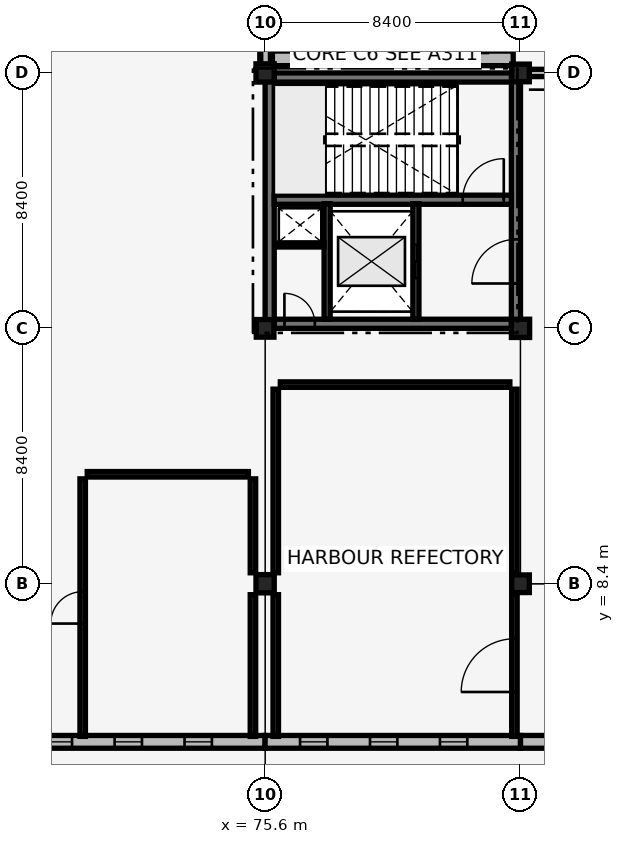
"""IFC4 building model, lengths in metres.
Left out: names, types, materials, properties, quantities, classifications, styles, units other than length and angle.
Written with IfcOpenShell. Run it as: python <this file> out.ifc"""

import sys

from ifc_helpers import new_model, si_unit, direction, frame, frame_2d, origin, origin_2d, place, context, subcontext, project, spatial, polyline, rectangle, outline, extrude, element, fill, save


model = new_model("IFC4")
c1 = context("Model", 3, precision=1e-05, world=origin(), true_north=direction((0.0, 1.0)))
c2 = subcontext(c1, "Body", "Model", "MODEL_VIEW")
j1 = project(units=[si_unit("LENGTHUNIT", "METRE"), si_unit("PLANEANGLEUNIT", "RADIAN")], contexts=[c1])
p1 = place(None, origin())
s1 = spatial("IfcSite", under=j1, at=p1, CompositionType="ELEMENT")
p2 = place(p1, origin())
s2 = spatial("IfcBuilding", under=s1, at=p2, CompositionType="ELEMENT")
p3 = place(p2, origin())
s3 = spatial("IfcBuildingStorey", under=s2, at=p3, CompositionType="ELEMENT", Elevation=0.0)
p4 = place(p3, frame((75.75, 16.95, 0.0), z_axis=(0.0, 0.0, 1.0), x_axis=(1.0, 0.0, 0.0)))
e1 = element("IfcWall", 1, at=p4, inside=s3, PredefinedType="SHEAR", context=c2, shape_type="SweptSolid", body=[
    extrude(rectangle(XDim=8.1, YDim=0.3, at=frame_2d((4.05, 0.0))), origin(), (0.0, 0.0, 1.0), 5.14),
])
p5 = place(p4, frame((0.485, 0.0, 0.0)))
e2 = element("IfcOpeningElement", 2, at=p5, cuts=e1, PredefinedType="OPENING", context=c2, shape_type="SweptSolid", body=[
    extrude(rectangle(XDim=1.0, YDim=2.15, at=frame_2d((0.5, 1.075))), frame((0.0, 0.16, 0.0), z_axis=(0.0, -1.0, 0.0), x_axis=(1.0, 0.0, 0.0)), (0.0, 0.0, 1.0), 0.32),
])
for number, where, z_axis, x_axis in (
    (3, (75.75, 25.05, 0.0), (0.0, 0.0, 1.0), (1.0, 0.0, 0.0)),
    (4, (75.75, 16.95, 0.0), (0.0, 0.0, 1.0), (0.0, 1.0, 0.0)),
):
    element("IfcWall", number, at=place(p3, frame(where, z_axis=z_axis, x_axis=x_axis)), inside=s3, PredefinedType="SHEAR", context=c2, shape_type="SweptSolid", body=[
        extrude(rectangle(XDim=8.1, YDim=0.3, at=frame_2d((4.05, 0.0))), origin(), (0.0, 0.0, 1.0), 5.14),
    ])
p6 = place(p3, frame((83.85, 16.95, 0.0), z_axis=(0.0, 0.0, 1.0), x_axis=(0.0, 1.0, 0.0)))
e5 = element("IfcWall", 5, at=p6, inside=s3, PredefinedType="SHEAR", context=c2, shape_type="SweptSolid", body=[
    extrude(rectangle(XDim=8.1, YDim=0.3, at=frame_2d((4.05, 0.0))), origin(), (0.0, 0.0, 1.0), 5.14),
])
p7 = place(p6, frame((1.325, 0.0, 0.0)))
e6 = element("IfcOpeningElement", 6, at=p7, cuts=e5, PredefinedType="OPENING", context=c2, shape_type="SweptSolid", body=[
    extrude(rectangle(XDim=1.45, YDim=2.15, at=frame_2d((0.725, 1.075))), frame((0.0, 0.16, 0.0), z_axis=(0.0, -1.0, 0.0), x_axis=(1.0, 0.0, 0.0)), (0.0, 0.0, 1.0), 0.32),
])
p8 = place(p3, frame((75.9, 21.03, 0.0), z_axis=(0.0, 0.0, 1.0), x_axis=(1.0, 0.0, 0.0)))
e7 = element("IfcWall", 7, at=p8, inside=s3, PredefinedType="SHEAR", context=c2, shape_type="SweptSolid", body=[
    extrude(rectangle(XDim=7.8, YDim=0.3, at=frame_2d((3.9, 0.0))), origin(), (0.0, 0.0, 1.0), 5.14),
])
p9 = place(p8, frame((6.2, 0.0, 0.0)))
e8 = element("IfcOpeningElement", 8, at=p9, cuts=e7, PredefinedType="OPENING", context=c2, shape_type="SweptSolid", body=[
    extrude(rectangle(XDim=1.35, YDim=2.15, at=frame_2d((0.675, 1.075))), frame((0.0, 0.16, 0.0), z_axis=(0.0, -1.0, 0.0), x_axis=(1.0, 0.0, 0.0)), (0.0, 0.0, 1.0), 0.32),
])
p10 = place(p3, frame((75.6, 8.4, 0.0), z_axis=(0.0, 0.0, 1.0), x_axis=(1.0, 0.0, 0.0)))
e9 = element("IfcColumn", 9, at=p10, inside=s3, PredefinedType="COLUMN", context=c2, shape_type="SweptSolid", body=[
    extrude(rectangle(XDim=0.6, YDim=0.6, at=origin_2d()), origin(), (0.0, 0.0, 1.0), 5.14),
])
p11 = place(p3, frame((75.6, 16.8, 0.0), z_axis=(0.0, 0.0, 1.0), x_axis=(1.0, 0.0, 0.0)))
e10 = element("IfcColumn", 10, at=p11, inside=s3, PredefinedType="COLUMN", context=c2, shape_type="SweptSolid", body=[
    extrude(rectangle(XDim=0.58, YDim=0.58, at=origin_2d()), origin(), (0.0, 0.0, 1.0), 5.14),
])
p12 = place(p3, frame((75.6, 25.2, 0.0), z_axis=(0.0, 0.0, 1.0), x_axis=(1.0, 0.0, 0.0)))
e11 = element("IfcColumn", 11, at=p12, inside=s3, PredefinedType="COLUMN", context=c2, shape_type="SweptSolid", body=[
    extrude(rectangle(XDim=0.6, YDim=0.6, at=origin_2d()), origin(), (0.0, 0.0, 1.0), 5.14),
])
p13 = place(p3, frame((84.0, 8.4, 0.0), z_axis=(0.0, 0.0, 1.0), x_axis=(1.0, 0.0, 0.0)))
e12 = element("IfcColumn", 12, at=p13, inside=s3, PredefinedType="COLUMN", context=c2, shape_type="SweptSolid", body=[
    extrude(rectangle(XDim=0.58, YDim=0.58, at=origin_2d()), origin(), (0.0, 0.0, 1.0), 5.14),
])
p14 = place(p3, frame((84.0, 16.8, 0.0), z_axis=(0.0, 0.0, 1.0), x_axis=(1.0, 0.0, 0.0)))
e13 = element("IfcColumn", 13, at=p14, inside=s3, PredefinedType="COLUMN", context=c2, shape_type="SweptSolid", body=[
    extrude(rectangle(XDim=0.6, YDim=0.6, at=origin_2d()), origin(), (0.0, 0.0, 1.0), 5.14),
])
p15 = place(p3, frame((84.0, 25.2, 0.0), z_axis=(0.0, 0.0, 1.0), x_axis=(1.0, 0.0, 0.0)))
e14 = element("IfcColumn", 14, at=p15, inside=s3, PredefinedType="COLUMN", context=c2, shape_type="SweptSolid", body=[
    extrude(rectangle(XDim=0.58, YDim=0.58, at=origin_2d()), origin(), (0.0, 0.0, 1.0), 5.14),
])
p16 = place(p3, frame((75.6, 25.2, 5.145), z_axis=(0.0, 0.0, 1.0), x_axis=(0.0, 1.0, 0.0)))
e15 = element("IfcWall", 15, at=p16, inside=s3, PredefinedType="SOLIDWALL", context=c2, shape_type="SweptSolid", body=[
    extrude(outline(polyline([(0.0, 0.0), (8.4, 0.0), (8.4, 0.25), (4.2, 2.489), (0.0, 0.25), (0.0, 0.0)])), frame((0.0, 0.175, 0.0), z_axis=(0.0, -1.0, 0.0), x_axis=(1.0, 0.0, 0.0)), (0.0, 0.0, 1.0), 0.35),
])
p17 = place(p3, frame((67.2, 3.2, 0.0), z_axis=(0.0, 0.0, 1.0), x_axis=(1.0, 0.0, 0.0)))
e16 = element("IfcWall", 16, at=p17, inside=s3, PredefinedType="SOLIDWALL", context=c2, shape_type="SweptSolid", body=[
    extrude(rectangle(XDim=8.4, YDim=0.42, at=frame_2d((4.2, 0.0))), origin(), (0.0, 0.0, 1.0), 4.83),
])
p18 = place(p17, frame((1.15, 0.0, 0.85)))
e17 = element("IfcOpeningElement", 17, at=p18, cuts=e16, PredefinedType="OPENING", context=c2, shape_type="SweptSolid", body=[
    extrude(rectangle(XDim=0.9, YDim=3.0, at=frame_2d((0.45, 1.5))), frame((0.0, 0.22, 0.0), z_axis=(0.0, -1.0, 0.0), x_axis=(1.0, 0.0, 0.0)), (0.0, 0.0, 1.0), 0.44),
])
p19 = place(p17, frame((3.45, 0.0, 0.85)))
e18 = element("IfcOpeningElement", 18, at=p19, cuts=e16, PredefinedType="OPENING", context=c2, shape_type="SweptSolid", body=[
    extrude(rectangle(XDim=0.9, YDim=3.0, at=frame_2d((0.45, 1.5))), frame((0.0, 0.22, 0.0), z_axis=(0.0, -1.0, 0.0), x_axis=(1.0, 0.0, 0.0)), (0.0, 0.0, 1.0), 0.44),
])
p20 = place(p17, frame((5.75, 0.0, 0.85)))
e19 = element("IfcOpeningElement", 19, at=p20, cuts=e16, PredefinedType="OPENING", context=c2, shape_type="SweptSolid", body=[
    extrude(rectangle(XDim=0.9, YDim=3.0, at=frame_2d((0.45, 1.5))), frame((0.0, 0.22, 0.0), z_axis=(0.0, -1.0, 0.0), x_axis=(1.0, 0.0, 0.0)), (0.0, 0.0, 1.0), 0.44),
])
p21 = place(p3, frame((75.6, 3.2, 0.0), z_axis=(0.0, 0.0, 1.0), x_axis=(1.0, 0.0, 0.0)))
e20 = element("IfcWall", 20, at=p21, inside=s3, PredefinedType="SOLIDWALL", context=c2, shape_type="SweptSolid", body=[
    extrude(rectangle(XDim=8.4, YDim=0.42, at=frame_2d((4.2, 0.0))), origin(), (0.0, 0.0, 1.0), 4.49),
])
p22 = place(p21, frame((1.15, 0.0, 0.85)))
e21 = element("IfcOpeningElement", 21, at=p22, cuts=e20, PredefinedType="OPENING", context=c2, shape_type="SweptSolid", body=[
    extrude(rectangle(XDim=0.9, YDim=3.0, at=frame_2d((0.45, 1.5))), frame((0.0, 0.22, 0.0), z_axis=(0.0, -1.0, 0.0), x_axis=(1.0, 0.0, 0.0)), (0.0, 0.0, 1.0), 0.44),
])
p23 = place(p21, frame((3.45, 0.0, 0.85)))
e22 = element("IfcOpeningElement", 22, at=p23, cuts=e20, PredefinedType="OPENING", context=c2, shape_type="SweptSolid", body=[
    extrude(rectangle(XDim=0.9, YDim=3.0, at=frame_2d((0.45, 1.5))), frame((0.0, 0.22, 0.0), z_axis=(0.0, -1.0, 0.0), x_axis=(1.0, 0.0, 0.0)), (0.0, 0.0, 1.0), 0.44),
])
p24 = place(p21, frame((5.75, 0.0, 0.85)))
e23 = element("IfcOpeningElement", 23, at=p24, cuts=e20, PredefinedType="OPENING", context=c2, shape_type="SweptSolid", body=[
    extrude(rectangle(XDim=0.9, YDim=3.0, at=frame_2d((0.45, 1.5))), frame((0.0, 0.22, 0.0), z_axis=(0.0, -1.0, 0.0), x_axis=(1.0, 0.0, 0.0)), (0.0, 0.0, 1.0), 0.44),
])
p25 = place(p3, frame((75.84, 25.68, -0.25), z_axis=(0.0, 0.0, 1.0), x_axis=(1.0, 0.0, 0.0)))
e24 = element("IfcWall", 24, at=p25, inside=s3, PredefinedType="SOLIDWALL", context=c2, shape_type="SweptSolid", body=[
    extrude(rectangle(XDim=7.92, YDim=0.48, at=frame_2d((3.96, 0.0))), origin(), (0.0, 0.0, 1.0), 5.69),
])
p26 = place(p3, frame((84.0, 3.2, 0.0), z_axis=(0.0, 0.0, 1.0), x_axis=(1.0, 0.0, 0.0)))
e25 = element("IfcWall", 25, at=p26, inside=s3, PredefinedType="SOLIDWALL", context=c2, shape_type="SweptSolid", body=[
    extrude(rectangle(XDim=8.4, YDim=0.42, at=frame_2d((4.2, 0.0))), origin(), (0.0, 0.0, 1.0), 4.49),
])
p27 = place(p26, frame((3.1, 0.0, 0.0)))
e26 = element("IfcOpeningElement", 26, at=p27, cuts=e25, PredefinedType="OPENING", context=c2, shape_type="SweptSolid", body=[
    extrude(rectangle(XDim=2.2, YDim=2.4, at=frame_2d((1.1, 1.2))), frame((0.0, 0.22, 0.0), z_axis=(0.0, -1.0, 0.0), x_axis=(1.0, 0.0, 0.0)), (0.0, 0.0, 1.0), 0.44),
])
p28 = place(p3, frame((84.275, 25.2, 0.0), z_axis=(0.0, 0.0, 1.0), x_axis=(1.0, 0.0, 0.0)))
e27 = element("IfcWall", 27, at=p28, inside=s3, PredefinedType="SOLIDWALL", context=c2, shape_type="SweptSolid", body=[
    extrude(rectangle(XDim=7.84, YDim=0.24, at=frame_2d((3.92, 0.0))), origin(), (0.0, 0.0, 1.0), 4.39),
])
p29 = place(p28, frame((0.804, 0.0, 0.35)))
e28 = element("IfcOpeningElement", 28, at=p29, cuts=e27, PredefinedType="OPENING", context=c2, shape_type="SweptSolid", body=[
    extrude(rectangle(XDim=0.44, YDim=1.25, at=frame_2d((0.22, 0.625))), frame((0.0, 0.13, 0.0), z_axis=(0.0, -1.0, 0.0), x_axis=(1.0, 0.0, 0.0)), (0.0, 0.0, 1.0), 0.26),
])
p30 = place(p28, frame((2.252, 0.0, 0.35)))
e29 = element("IfcOpeningElement", 29, at=p30, cuts=e27, PredefinedType="OPENING", context=c2, shape_type="SweptSolid", body=[
    extrude(rectangle(XDim=0.44, YDim=1.25, at=frame_2d((0.22, 0.625))), frame((0.0, 0.13, 0.0), z_axis=(0.0, -1.0, 0.0), x_axis=(1.0, 0.0, 0.0)), (0.0, 0.0, 1.0), 0.26),
])
p31 = place(p28, frame((3.7, 0.0, 0.35)))
e30 = element("IfcOpeningElement", 30, at=p31, cuts=e27, PredefinedType="OPENING", context=c2, shape_type="SweptSolid", body=[
    extrude(rectangle(XDim=0.44, YDim=1.25, at=frame_2d((0.22, 0.625))), frame((0.0, 0.13, 0.0), z_axis=(0.0, -1.0, 0.0), x_axis=(1.0, 0.0, 0.0)), (0.0, 0.0, 1.0), 0.26),
])
p32 = place(p28, frame((5.148, 0.0, 0.35)))
e31 = element("IfcOpeningElement", 31, at=p32, cuts=e27, PredefinedType="OPENING", context=c2, shape_type="SweptSolid", body=[
    extrude(rectangle(XDim=0.44, YDim=1.25, at=frame_2d((0.22, 0.625))), frame((0.0, 0.13, 0.0), z_axis=(0.0, -1.0, 0.0), x_axis=(1.0, 0.0, 0.0)), (0.0, 0.0, 1.0), 0.26),
])
p33 = place(p28, frame((6.596, 0.0, 0.35)))
e32 = element("IfcOpeningElement", 32, at=p33, cuts=e27, PredefinedType="OPENING", context=c2, shape_type="SweptSolid", body=[
    extrude(rectangle(XDim=0.44, YDim=1.25, at=frame_2d((0.22, 0.625))), frame((0.0, 0.13, 0.0), z_axis=(0.0, -1.0, 0.0), x_axis=(1.0, 0.0, 0.0)), (0.0, 0.0, 1.0), 0.26),
])
p34 = place(p28, frame((0.804, 0.0, 1.8)))
e33 = element("IfcOpeningElement", 33, at=p34, cuts=e27, PredefinedType="OPENING", context=c2, shape_type="SweptSolid", body=[
    extrude(rectangle(XDim=0.44, YDim=1.25, at=frame_2d((0.22, 0.625))), frame((0.0, 0.13, 0.0), z_axis=(0.0, -1.0, 0.0), x_axis=(1.0, 0.0, 0.0)), (0.0, 0.0, 1.0), 0.26),
])
p35 = place(p28, frame((2.252, 0.0, 1.8)))
e34 = element("IfcOpeningElement", 34, at=p35, cuts=e27, PredefinedType="OPENING", context=c2, shape_type="SweptSolid", body=[
    extrude(rectangle(XDim=0.44, YDim=1.25, at=frame_2d((0.22, 0.625))), frame((0.0, 0.13, 0.0), z_axis=(0.0, -1.0, 0.0), x_axis=(1.0, 0.0, 0.0)), (0.0, 0.0, 1.0), 0.26),
])
p36 = place(p28, frame((3.7, 0.0, 1.8)))
e35 = element("IfcOpeningElement", 35, at=p36, cuts=e27, PredefinedType="OPENING", context=c2, shape_type="SweptSolid", body=[
    extrude(rectangle(XDim=0.44, YDim=1.25, at=frame_2d((0.22, 0.625))), frame((0.0, 0.13, 0.0), z_axis=(0.0, -1.0, 0.0), x_axis=(1.0, 0.0, 0.0)), (0.0, 0.0, 1.0), 0.26),
])
p37 = place(p28, frame((5.148, 0.0, 1.8)))
e36 = element("IfcOpeningElement", 36, at=p37, cuts=e27, PredefinedType="OPENING", context=c2, shape_type="SweptSolid", body=[
    extrude(rectangle(XDim=0.44, YDim=1.25, at=frame_2d((0.22, 0.625))), frame((0.0, 0.13, 0.0), z_axis=(0.0, -1.0, 0.0), x_axis=(1.0, 0.0, 0.0)), (0.0, 0.0, 1.0), 0.26),
])
p38 = place(p28, frame((6.596, 0.0, 1.8)))
e37 = element("IfcOpeningElement", 37, at=p38, cuts=e27, PredefinedType="OPENING", context=c2, shape_type="SweptSolid", body=[
    extrude(rectangle(XDim=0.44, YDim=1.25, at=frame_2d((0.22, 0.625))), frame((0.0, 0.13, 0.0), z_axis=(0.0, -1.0, 0.0), x_axis=(1.0, 0.0, 0.0)), (0.0, 0.0, 1.0), 0.26),
])
p39 = place(p3, frame((80.56, 17.1, 0.0), z_axis=(0.0, 0.0, 1.0), x_axis=(0.0, 1.0, 0.0)))
e38 = element("IfcWall", 38, at=p39, inside=s3, PredefinedType="SHEAR", context=c2, shape_type="SweptSolid", body=[
    extrude(rectangle(XDim=3.8, YDim=0.2, at=frame_2d((1.9, 0.0))), origin(), (0.0, 0.0, 1.0), 4.36),
])
p40 = place(p39, frame((1.35, 0.0, 0.0)))
e39 = element("IfcOpeningElement", 39, at=p40, cuts=e38, PredefinedType="OPENING", context=c2, shape_type="SweptSolid", body=[
    extrude(rectangle(XDim=1.1, YDim=2.15, at=frame_2d((0.55, 1.075))), frame((0.0, 0.11, 0.0), z_axis=(0.0, -1.0, 0.0), x_axis=(1.0, 0.0, 0.0)), (0.0, 0.0, 1.0), 0.22),
])
p41 = place(p3, frame((77.64, 17.1, 0.0), z_axis=(0.0, 0.0, 1.0), x_axis=(0.0, 1.0, 0.0)))
e40 = element("IfcWall", 40, at=p41, inside=s3, PredefinedType="SHEAR", context=c2, shape_type="SweptSolid", body=[
    extrude(rectangle(XDim=3.8, YDim=0.2, at=frame_2d((1.9, 0.0))), origin(), (0.0, 0.0, 1.0), 4.36),
])
p42 = place(p3, frame((75.92, 19.54, 0.0), z_axis=(0.0, 0.0, 1.0), x_axis=(1.0, 0.0, 0.0)))
e41 = element("IfcWall", 41, at=p42, inside=s3, PredefinedType="PARTITIONING", context=c2, shape_type="SweptSolid", body=[
    extrude(rectangle(XDim=1.62, YDim=0.13, at=frame_2d((0.81, 0.0))), origin(), (0.0, 0.0, 1.0), 5.14),
])
p43 = place(p3, frame((69.6, 3.38, 0.0), z_axis=(0.0, 0.0, 1.0), x_axis=(0.0, 1.0, 0.0)))
e42 = element("IfcWall", 42, at=p43, inside=s3, PredefinedType="PARTITIONING", context=c2, shape_type="SweptSolid", body=[
    extrude(rectangle(XDim=8.47, YDim=0.18, at=frame_2d((4.235, 0.0))), origin(), (0.0, 0.0, 1.0), 4.39),
])
p44 = place(p43, frame((3.71, 0.0, 0.0)))
e43 = element("IfcOpeningElement", 43, at=p44, cuts=e42, PredefinedType="OPENING", context=c2, shape_type="SweptSolid", body=[
    extrude(rectangle(XDim=1.05, YDim=2.15, at=frame_2d((0.525, 1.075))), frame((0.0, 0.1, 0.0), z_axis=(0.0, -1.0, 0.0), x_axis=(1.0, 0.0, 0.0)), (0.0, 0.0, 1.0), 0.2),
])
p45 = place(p3, frame((69.75, 12.0, 0.0), z_axis=(0.0, 0.0, 1.0), x_axis=(1.0, 0.0, 0.0)))
e44 = element("IfcWall", 44, at=p45, inside=s3, PredefinedType="PARTITIONING", context=c2, shape_type="SweptSolid", body=[
    extrude(rectangle(XDim=5.3, YDim=0.18, at=frame_2d((2.65, 0.0))), origin(), (0.0, 0.0, 1.0), 5.14),
])
p46 = place(p3, frame((75.2, 3.38, 0.0), z_axis=(0.0, 0.0, 1.0), x_axis=(0.0, 1.0, 0.0)))
e45 = element("IfcWall", 45, at=p46, inside=s3, PredefinedType="PARTITIONING", context=c2, shape_type="SweptSolid", body=[
    extrude(rectangle(XDim=4.66, YDim=0.18, at=frame_2d((2.33, 0.0))), origin(), (0.0, 0.0, 1.0), 5.14),
])
p47 = place(p3, frame((75.2, 8.76, 0.0), z_axis=(0.0, 0.0, 1.0), x_axis=(0.0, 1.0, 0.0)))
e46 = element("IfcWall", 46, at=p47, inside=s3, PredefinedType="PARTITIONING", context=c2, shape_type="SweptSolid", body=[
    extrude(rectangle(XDim=3.09, YDim=0.18, at=frame_2d((1.545, 0.0))), origin(), (0.0, 0.0, 1.0), 5.14),
])
p48 = place(p3, frame((83.8, 3.38, 0.0), z_axis=(0.0, 0.0, 1.0), x_axis=(0.0, 1.0, 0.0)))
e47 = element("IfcWall", 47, at=p48, inside=s3, PredefinedType="PARTITIONING", context=c2, shape_type="SweptSolid", body=[
    extrude(rectangle(XDim=4.67, YDim=0.18, at=frame_2d((2.335, 0.0))), origin(), (0.0, 0.0, 1.0), 4.49),
])
p49 = place(p48, frame((1.46, 0.0, 0.0)))
e48 = element("IfcOpeningElement", 48, at=p49, cuts=e47, PredefinedType="OPENING", context=c2, shape_type="SweptSolid", body=[
    extrude(rectangle(XDim=1.75, YDim=2.3, at=frame_2d((0.875, 1.15))), frame((0.0, 0.1, 0.0), z_axis=(0.0, -1.0, 0.0), x_axis=(1.0, 0.0, 0.0)), (0.0, 0.0, 1.0), 0.2),
])
p50 = place(p3, frame((83.8, 8.75, 0.0), z_axis=(0.0, 0.0, 1.0), x_axis=(0.0, 1.0, 0.0)))
e49 = element("IfcWall", 49, at=p50, inside=s3, PredefinedType="PARTITIONING", context=c2, shape_type="SweptSolid", body=[
    extrude(rectangle(XDim=6.05, YDim=0.18, at=frame_2d((3.025, 0.0))), origin(), (0.0, 0.0, 1.0), 4.49),
])
p51 = place(p3, frame((76.1, 14.95, 0.0), z_axis=(0.0, 0.0, 1.0), x_axis=(1.0, 0.0, 0.0)))
e50 = element("IfcWall", 50, at=p51, inside=s3, PredefinedType="PARTITIONING", context=c2, shape_type="SweptSolid", body=[
    extrude(rectangle(XDim=7.55, YDim=0.18, at=frame_2d((3.775, 0.0))), origin(), (0.0, 0.0, 1.0), 5.14),
])
p52 = place(p3, frame((75.95, 3.38, 0.0), z_axis=(0.0, 0.0, 1.0), x_axis=(0.0, 1.0, 0.0)))
e51 = element("IfcWall", 51, at=p52, inside=s3, PredefinedType="PARTITIONING", context=c2, shape_type="SweptSolid", body=[
    extrude(rectangle(XDim=4.66, YDim=0.18, at=frame_2d((2.33, 0.0))), origin(), (0.0, 0.0, 1.0), 4.58),
])
p53 = place(p3, frame((75.95, 8.76, 0.0), z_axis=(0.0, 0.0, 1.0), x_axis=(0.0, 1.0, 0.0)))
e52 = element("IfcWall", 52, at=p53, inside=s3, PredefinedType="PARTITIONING", context=c2, shape_type="SweptSolid", body=[
    extrude(rectangle(XDim=6.04, YDim=0.18, at=frame_2d((3.02, 0.0))), origin(), (0.0, 0.0, 1.0), 4.59),
])
p54 = place(p18, origin())
e53 = element("IfcWindow", 53, at=p54, inside=s3, PartitioningType="DOUBLE_PANEL_VERTICAL", PredefinedType="WINDOW", context=c2, shape_type="SweptSolid", body=[
    extrude(rectangle(XDim=0.9, YDim=3.0, at=frame_2d((0.45, 1.5))), frame((0.0, 0.03, 0.0), z_axis=(0.0, -1.0, 0.0), x_axis=(1.0, 0.0, 0.0)), (0.0, 0.0, 1.0), 0.06),
])
fill(e17, e53)
p55 = place(p19, origin())
e54 = element("IfcWindow", 54, at=p55, inside=s3, PartitioningType="DOUBLE_PANEL_VERTICAL", PredefinedType="WINDOW", context=c2, shape_type="SweptSolid", body=[
    extrude(rectangle(XDim=0.9, YDim=3.0, at=frame_2d((0.45, 1.5))), frame((0.0, 0.03, 0.0), z_axis=(0.0, -1.0, 0.0), x_axis=(1.0, 0.0, 0.0)), (0.0, 0.0, 1.0), 0.06),
])
fill(e18, e54)
p56 = place(p20, origin())
e55 = element("IfcWindow", 55, at=p56, inside=s3, PartitioningType="DOUBLE_PANEL_VERTICAL", PredefinedType="WINDOW", context=c2, shape_type="SweptSolid", body=[
    extrude(rectangle(XDim=0.9, YDim=3.0, at=frame_2d((0.45, 1.5))), frame((0.0, 0.03, 0.0), z_axis=(0.0, -1.0, 0.0), x_axis=(1.0, 0.0, 0.0)), (0.0, 0.0, 1.0), 0.06),
])
fill(e19, e55)
p57 = place(p22, origin())
e56 = element("IfcWindow", 56, at=p57, inside=s3, PartitioningType="DOUBLE_PANEL_VERTICAL", PredefinedType="WINDOW", context=c2, shape_type="SweptSolid", body=[
    extrude(rectangle(XDim=0.9, YDim=3.0, at=frame_2d((0.45, 1.5))), frame((0.0, 0.03, 0.0), z_axis=(0.0, -1.0, 0.0), x_axis=(1.0, 0.0, 0.0)), (0.0, 0.0, 1.0), 0.06),
])
fill(e21, e56)
p58 = place(p23, origin())
e57 = element("IfcWindow", 57, at=p58, inside=s3, PartitioningType="DOUBLE_PANEL_VERTICAL", PredefinedType="WINDOW", context=c2, shape_type="SweptSolid", body=[
    extrude(rectangle(XDim=0.9, YDim=3.0, at=frame_2d((0.45, 1.5))), frame((0.0, 0.03, 0.0), z_axis=(0.0, -1.0, 0.0), x_axis=(1.0, 0.0, 0.0)), (0.0, 0.0, 1.0), 0.06),
])
fill(e22, e57)
p59 = place(p24, origin())
e58 = element("IfcWindow", 58, at=p59, inside=s3, PartitioningType="DOUBLE_PANEL_VERTICAL", PredefinedType="WINDOW", context=c2, shape_type="SweptSolid", body=[
    extrude(rectangle(XDim=0.9, YDim=3.0, at=frame_2d((0.45, 1.5))), frame((0.0, 0.03, 0.0), z_axis=(0.0, -1.0, 0.0), x_axis=(1.0, 0.0, 0.0)), (0.0, 0.0, 1.0), 0.06),
])
fill(e23, e58)
p60 = place(p9, origin())
e59 = element("IfcDoor", 59, at=p60, inside=s3, OperationType="SINGLE_SWING_RIGHT", PredefinedType="DOOR", context=c2, shape_type="SweptSolid", body=[
    extrude(rectangle(XDim=1.35, YDim=2.15, at=frame_2d((0.675, 1.075))), frame((0.0, 0.025, 0.0), z_axis=(0.0, -1.0, 0.0), x_axis=(1.0, 0.0, 0.0)), (0.0, 0.0, 1.0), 0.05),
])
fill(e8, e59)
p61 = place(p40, origin())
e60 = element("IfcDoor", 60, at=p61, inside=s3, OperationType="SLIDING_TO_LEFT", PredefinedType="DOOR", context=c2, shape_type="SweptSolid", body=[
    extrude(rectangle(XDim=1.1, YDim=2.15, at=frame_2d((0.55, 1.075))), frame((0.0, 0.025, 0.0), z_axis=(0.0, -1.0, 0.0), x_axis=(1.0, 0.0, 0.0)), (0.0, 0.0, 1.0), 0.05),
])
fill(e39, e60)
p62 = place(p7, origin())
e61 = element("IfcDoor", 61, at=p62, inside=s3, OperationType="DOUBLE_DOOR_SINGLE_SWING", PredefinedType="DOOR", context=c2, shape_type="SweptSolid", body=[
    extrude(rectangle(XDim=1.45, YDim=2.15, at=frame_2d((0.725, 1.075))), frame((0.0, 0.025, 0.0), z_axis=(0.0, -1.0, 0.0), x_axis=(1.0, 0.0, 0.0)), (0.0, 0.0, 1.0), 0.05),
])
fill(e6, e61)
p63 = place(p5, origin())
e62 = element("IfcDoor", 62, at=p63, inside=s3, OperationType="SINGLE_SWING_LEFT", PredefinedType="DOOR", context=c2, shape_type="SweptSolid", body=[
    extrude(rectangle(XDim=1.0, YDim=2.15, at=frame_2d((0.5, 1.075))), frame((0.0, 0.025, 0.0), z_axis=(0.0, -1.0, 0.0), x_axis=(1.0, 0.0, 0.0)), (0.0, 0.0, 1.0), 0.05),
])
fill(e2, e62)
p64 = place(p44, origin())
e63 = element("IfcDoor", 63, at=p64, inside=s3, OperationType="SINGLE_SWING_LEFT", PredefinedType="DOOR", context=c2, shape_type="SweptSolid", body=[
    extrude(rectangle(XDim=1.05, YDim=2.15, at=frame_2d((0.525, 1.075))), frame((0.0, 0.025, 0.0), z_axis=(0.0, -1.0, 0.0), x_axis=(1.0, 0.0, 0.0)), (0.0, 0.0, 1.0), 0.05),
])
fill(e43, e63)
p65 = place(p49, origin())
e64 = element("IfcDoor", 64, at=p65, inside=s3, OperationType="DOUBLE_DOOR_SINGLE_SWING", PredefinedType="DOOR", context=c2, shape_type="SweptSolid", body=[
    extrude(rectangle(XDim=1.75, YDim=2.3, at=frame_2d((0.875, 1.15))), frame((0.0, 0.025, 0.0), z_axis=(0.0, -1.0, 0.0), x_axis=(1.0, 0.0, 0.0)), (0.0, 0.0, 1.0), 0.05),
])
fill(e48, e64)
save(model, sys.argv[1])
